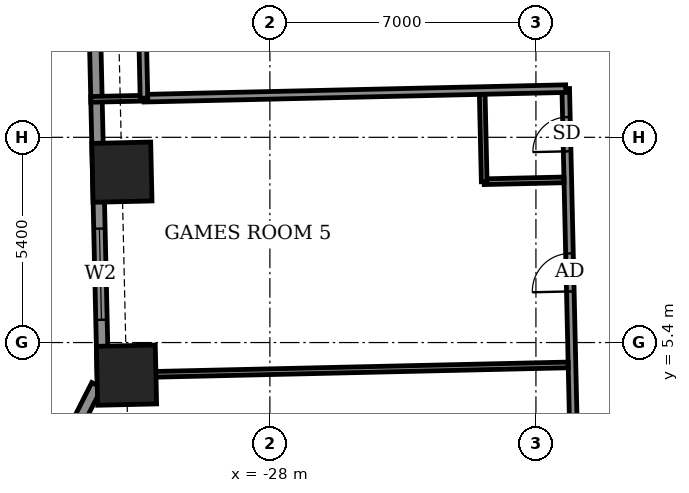
"""IFC4 building model, lengths in metres.
Left out: names, types, materials, properties, quantities, classifications, styles, units other than length and angle.
Written with IfcOpenShell. Run it as: python <this file> out.ifc"""

import sys

from ifc_helpers import new_model, si_unit, direction, frame, frame_2d, origin, origin_2d, place, context, subcontext, project, spatial, rectangle, extrude, element, fill, save


model = new_model("IFC4")
c1 = context("Model", 3, precision=1e-05, world=origin(), true_north=direction((0.0, 1.0)))
c2 = subcontext(c1, "Body", "Model", "MODEL_VIEW")
j1 = project(units=[si_unit("LENGTHUNIT", "METRE"), si_unit("PLANEANGLEUNIT", "RADIAN")], contexts=[c1])
p1 = place(None, origin())
s1 = spatial("IfcSite", under=j1, at=p1, CompositionType="ELEMENT")
p2 = place(p1, origin())
s2 = spatial("IfcBuilding", under=s1, at=p2, CompositionType="ELEMENT")
p3 = place(p2, frame((0.0, 0.0, 34.1)))
s3 = spatial("IfcBuildingStorey", under=s2, at=p3, CompositionType="ELEMENT", Elevation=34.1)
for number, where, z_axis, x_axis in (
    (1, (-31.894, 9.883, -0.55), (0.0, 0.0, 1.0), (0.023, -1.0, 0.0)),
    (2, (-31.773, 4.542, -0.55), (0.0, 0.0, 1.0), (0.023, -1.0, 0.0)),
):
    element("IfcColumn", number, at=place(p3, frame(where, z_axis=z_axis, x_axis=x_axis)), inside=s3, PredefinedType="COLUMN", context=c2, shape_type="SweptSolid", body=[
        extrude(rectangle(XDim=1.55, YDim=1.55, at=origin_2d()), origin(), (0.0, 0.0, 1.0), 3.6),
    ])
p4 = place(p3, frame((-32.758, 20.399, 0.0), z_axis=(0.0, 0.0, 1.0), x_axis=(0.022668485183, -0.999743036875, 0.0)))
e3 = element("IfcWall", 3, at=p4, inside=s3, PredefinedType="SOLIDWALL", context=c2, shape_type="SweptSolid", body=[
    extrude(rectangle(XDim=15.929, YDim=0.3, at=frame_2d((7.964, 0.0))), origin(), (0.0, 0.0, 1.0), 3.05),
])
p5 = place(p4, frame((2.183, 0.0, 0.0)))
e4 = element("IfcOpeningElement", 4, at=p5, cuts=e3, PredefinedType="OPENING", context=c2, shape_type="SweptSolid", body=[
    extrude(rectangle(XDim=1.5, YDim=2.4, at=frame_2d((0.75, 1.2))), frame((0.0, 0.16, 0.0), z_axis=(0.0, -1.0, 0.0), x_axis=(1.0, 0.0, 0.0)), (0.0, 0.0, 1.0), 0.32),
])
p6 = place(p4, frame((12.004, 0.0, 0.9)))
e5 = element("IfcOpeningElement", 5, at=p6, cuts=e3, PredefinedType="OPENING", context=c2, shape_type="SweptSolid", body=[
    extrude(rectangle(XDim=2.4, YDim=1.5, at=frame_2d((1.2, 0.75))), frame((0.0, 0.16, 0.0), z_axis=(0.0, -1.0, 0.0), x_axis=(1.0, 0.0, 0.0)), (0.0, 0.0, 1.0), 0.32),
])
p7 = place(p3, frame((-32.552, 4.28, 0.0), z_axis=(0.0, 0.0, 1.0), x_axis=(-0.452703975507, -0.891660871946, 0.0)))
e6 = element("IfcWall", 6, at=p7, inside=s3, PredefinedType="SOLIDWALL", context=c2, shape_type="SweptSolid", body=[
    extrude(rectangle(XDim=5.399, YDim=0.3, at=frame_2d((2.699, 0.0))), origin(), (0.0, 0.0, 1.0), 3.05),
])
p8 = place(p7, frame((2.007, 0.0, 0.9)))
e7 = element("IfcOpeningElement", 7, at=p8, cuts=e6, PredefinedType="OPENING", context=c2, shape_type="SweptSolid", body=[
    extrude(rectangle(XDim=1.2, YDim=1.5, at=frame_2d((0.6, 0.75))), frame((0.0, 0.16, 0.0), z_axis=(0.0, -1.0, 0.0), x_axis=(1.0, 0.0, 0.0)), (0.0, 0.0, 1.0), 0.32),
])
p9 = place(p3, frame((-19.589, -15.562, 0.0), z_axis=(0.0, 0.0, 1.0), x_axis=(-0.02267447203, 0.999742901109, 0.0)))
e8 = element("IfcWall", 8, at=p9, inside=s3, PredefinedType="PARTITIONING", context=c2, shape_type="SweptSolid", body=[
    extrude(rectangle(XDim=27.65, YDim=0.2, at=frame_2d((13.825, 0.0))), origin(), (0.0, 0.0, 1.0), 3.05),
])
p10 = place(p9, frame((22.313, 0.0, 0.0)))
e9 = element("IfcOpeningElement", 9, at=p10, cuts=e8, PredefinedType="OPENING", context=c2, shape_type="SweptSolid", body=[
    extrude(rectangle(XDim=1.0, YDim=2.1, at=frame_2d((0.5, 1.05))), frame((0.0, 0.11, 0.0), z_axis=(0.0, -1.0, 0.0), x_axis=(1.0, 0.0, 0.0)), (0.0, 0.0, 1.0), 0.22),
])
p11 = place(p9, frame((26.0, 0.0, 0.0)))
e10 = element("IfcOpeningElement", 10, at=p11, cuts=e8, PredefinedType="OPENING", context=c2, shape_type="SweptSolid", body=[
    extrude(rectangle(XDim=0.9, YDim=2.1, at=frame_2d((0.45, 1.05))), frame((0.0, 0.11, 0.0), z_axis=(0.0, -1.0, 0.0), x_axis=(1.0, 0.0, 0.0)), (0.0, 0.0, 1.0), 0.22),
])
p12 = place(p9, frame((17.843, 0.0, 0.0)))
e11 = element("IfcOpeningElement", 11, at=p12, cuts=e8, PredefinedType="OPENING", context=c2, shape_type="SweptSolid", body=[
    extrude(rectangle(XDim=1.0, YDim=2.1, at=frame_2d((0.5, 1.05))), frame((0.0, 0.11, 0.0), z_axis=(0.0, -1.0, 0.0), x_axis=(1.0, 0.0, 0.0)), (0.0, 0.0, 1.0), 0.22),
])
p13 = place(p9, frame((13.592, 0.0, 0.0)))
e12 = element("IfcOpeningElement", 12, at=p13, cuts=e8, PredefinedType="OPENING", context=c2, shape_type="SweptSolid", body=[
    extrude(rectangle(XDim=1.0, YDim=2.1, at=frame_2d((0.5, 1.05))), frame((0.0, 0.11, 0.0), z_axis=(0.0, -1.0, 0.0), x_axis=(1.0, 0.0, 0.0)), (0.0, 0.0, 1.0), 0.22),
])
p14 = place(p9, frame((10.0, 0.0, 0.0)))
e13 = element("IfcOpeningElement", 13, at=p14, cuts=e8, PredefinedType="OPENING", context=c2, shape_type="SweptSolid", body=[
    extrude(rectangle(XDim=1.0, YDim=2.1, at=frame_2d((0.5, 1.05))), frame((0.0, 0.11, 0.0), z_axis=(0.0, -1.0, 0.0), x_axis=(1.0, 0.0, 0.0)), (0.0, 0.0, 1.0), 0.22),
])
p15 = place(p9, frame((7.475, 0.0, 0.0)))
e14 = element("IfcOpeningElement", 14, at=p15, cuts=e8, PredefinedType="OPENING", context=c2, shape_type="SweptSolid", body=[
    extrude(rectangle(XDim=0.9, YDim=2.1, at=frame_2d((0.45, 1.05))), frame((0.0, 0.11, 0.0), z_axis=(0.0, -1.0, 0.0), x_axis=(1.0, 0.0, 0.0)), (0.0, 0.0, 1.0), 0.22),
])
p16 = place(p9, frame((4.613, 0.0, 0.0)))
e15 = element("IfcOpeningElement", 15, at=p16, cuts=e8, PredefinedType="OPENING", context=c2, shape_type="SweptSolid", body=[
    extrude(rectangle(XDim=1.0, YDim=2.1, at=frame_2d((0.5, 1.05))), frame((0.0, 0.11, 0.0), z_axis=(0.0, -1.0, 0.0), x_axis=(1.0, 0.0, 0.0)), (0.0, 0.0, 1.0), 0.22),
])
p17 = place(p3, frame((-32.248, 4.536, 0.0), z_axis=(0.0, 0.0, 1.0), x_axis=(0.999741439573, 0.022738821441, 0.0)))
e16 = element("IfcWall", 16, at=p17, inside=s3, PredefinedType="PARTITIONING", context=c2, shape_type="SweptSolid", body=[
    extrude(rectangle(XDim=12.1, YDim=0.15, at=frame_2d((6.05, 0.0))), origin(), (0.0, 0.0, 1.0), 3.05),
])
p18 = place(p3, frame((-22.361, 9.632, 0.0), z_axis=(0.0, 0.0, 1.0), x_axis=(0.999740272436, 0.02279007832, 0.0)))
e17 = element("IfcWall", 17, at=p18, inside=s3, PredefinedType="PARTITIONING", context=c2, shape_type="SweptSolid", body=[
    extrude(rectangle(XDim=2.1, YDim=0.15, at=frame_2d((1.05, 0.0))), origin(), (0.0, 0.0, 1.0), 3.05),
])
p19 = place(p3, frame((-22.361, 9.632, 0.0), z_axis=(0.0, 0.0, 1.0), x_axis=(-0.022615284993, 0.999744241736, 0.0)))
e18 = element("IfcWall", 18, at=p19, inside=s3, PredefinedType="PARTITIONING", context=c2, shape_type="SweptSolid", body=[
    extrude(rectangle(XDim=2.299, YDim=0.15, at=frame_2d((1.15, 0.0))), origin(), (0.0, 0.0, 1.0), 3.05),
])
p20 = place(p3, frame((-32.713, 11.798, 0.0), z_axis=(0.0, 0.0, 1.0), x_axis=(0.999756172383, 0.022081571112, 0.0)))
e19 = element("IfcWall", 19, at=p20, inside=s3, PredefinedType="PARTITIONING", context=c2, shape_type="SweptSolid", body=[
    extrude(rectangle(XDim=1.404, YDim=0.15, at=frame_2d((0.702, 0.0))), origin(), (0.0, 0.0, 1.0), 2.55),
])
p21 = place(p3, frame((-31.313, 11.829, 0.0), z_axis=(0.0, 0.0, 1.0), x_axis=(0.999742346277, 0.022698921993, 0.0)))
e20 = element("IfcWall", 20, at=p21, inside=s3, PredefinedType="PARTITIONING", context=c2, shape_type="SweptSolid", body=[
    extrude(rectangle(XDim=11.1, YDim=0.2, at=frame_2d((5.55, 0.0))), origin(), (0.0, 0.0, 1.0), 3.05),
])
p22 = place(p3, frame((-31.313, 11.829, 0.0), z_axis=(0.0, 0.0, 1.0), x_axis=(-0.022617910375, 0.999744182344, 0.0)))
e21 = element("IfcWall", 21, at=p22, inside=s3, PredefinedType="PARTITIONING", context=c2, shape_type="SweptSolid", body=[
    extrude(rectangle(XDim=1.5, YDim=0.2, at=frame_2d((0.75, 0.0))), origin(), (0.0, 0.0, 1.0), 3.05),
])
p23 = place(p6, origin())
e22 = element("IfcWindow", 22, at=p23, inside=s3, PartitioningType="DOUBLE_PANEL_VERTICAL", PredefinedType="WINDOW", context=c2, shape_type="SweptSolid", body=[
    extrude(rectangle(XDim=2.4, YDim=1.5, at=frame_2d((1.2, 0.75))), frame((0.0, 0.03, 0.0), z_axis=(0.0, -1.0, 0.0), x_axis=(1.0, 0.0, 0.0)), (0.0, 0.0, 1.0), 0.06),
])
fill(e5, e22)
p24 = place(p10, origin())
e23 = element("IfcDoor", 23, at=p24, inside=s3, OperationType="SINGLE_SWING_LEFT", PredefinedType="DOOR", context=c2, shape_type="SweptSolid", body=[
    extrude(rectangle(XDim=1.0, YDim=2.1, at=frame_2d((0.5, 1.05))), frame((0.0, 0.025, 0.0), z_axis=(0.0, -1.0, 0.0), x_axis=(1.0, 0.0, 0.0)), (0.0, 0.0, 1.0), 0.05),
])
fill(e9, e23)
p25 = place(p11, origin())
e24 = element("IfcDoor", 24, at=p25, inside=s3, OperationType="SINGLE_SWING_RIGHT", PredefinedType="DOOR", context=c2, shape_type="SweptSolid", body=[
    extrude(rectangle(XDim=0.9, YDim=2.1, at=frame_2d((0.45, 1.05))), frame((0.0, 0.025, 0.0), z_axis=(0.0, -1.0, 0.0), x_axis=(1.0, 0.0, 0.0)), (0.0, 0.0, 1.0), 0.05),
])
fill(e10, e24)
save(model, sys.argv[1])
